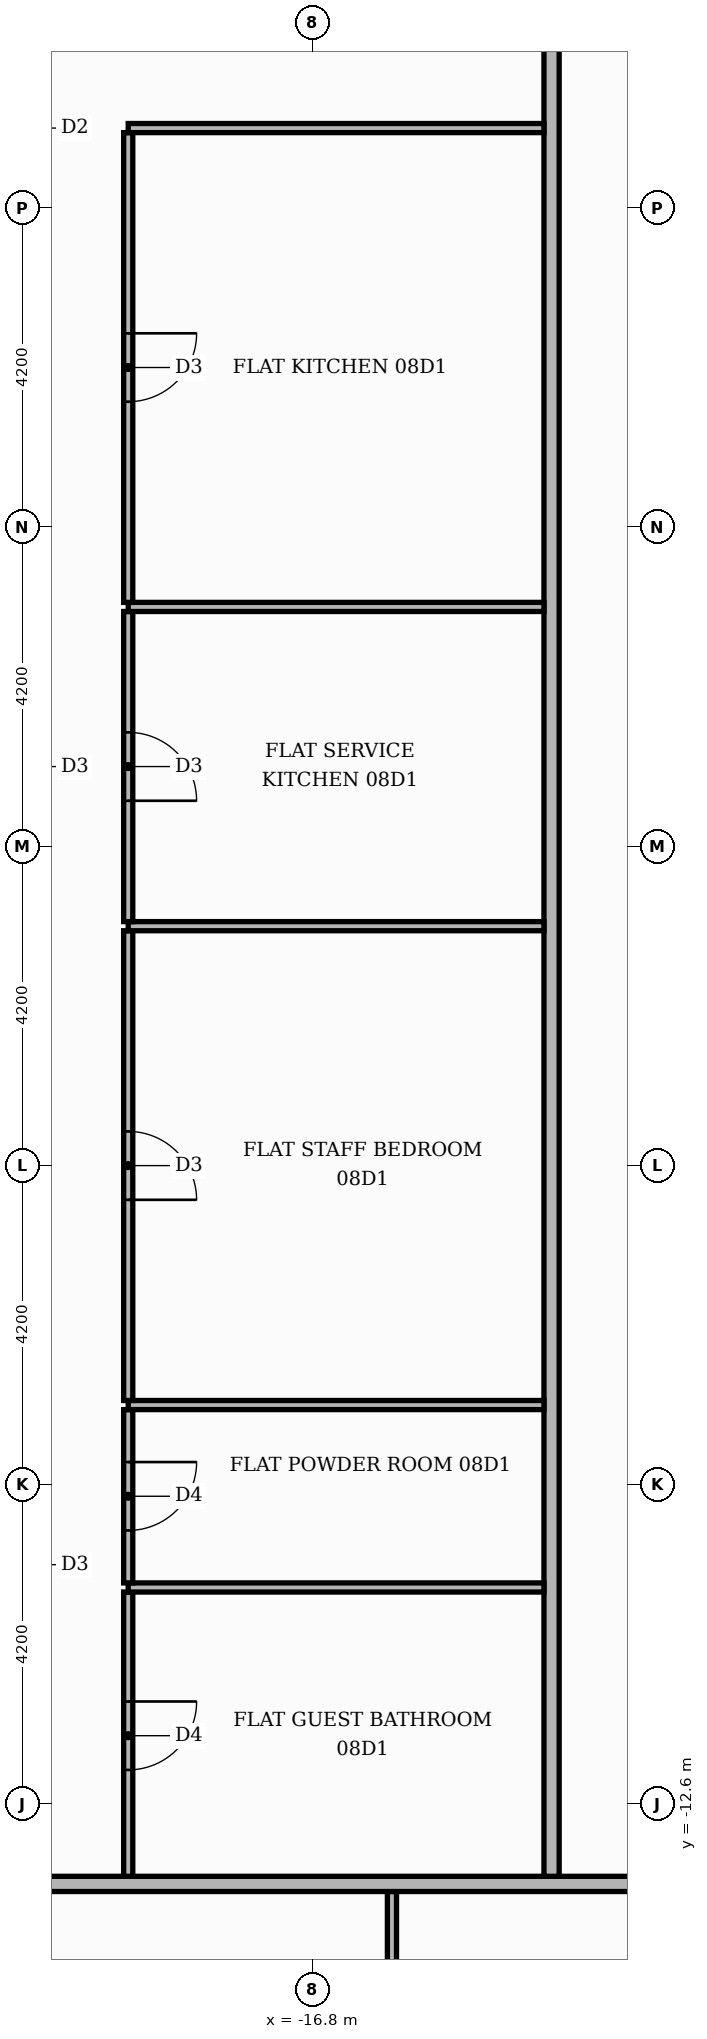
"""IFC4 building model, lengths in metres.
Left out: names, types, materials, properties, quantities, classifications, styles, units other than length and angle.
Written with IfcOpenShell. Run it as: python <this file> out.ifc"""

import sys

from ifc_helpers import new_model, si_unit, direction, frame, frame_2d, origin, place, context, subcontext, project, spatial, rectangle, extrude, element, fill, save


model = new_model("IFC4")
c1 = context("Model", 3, precision=1e-05, world=origin(), true_north=direction((0.0, 1.0)))
c2 = subcontext(c1, "Body", "Model", "MODEL_VIEW")
j1 = project(units=[si_unit("LENGTHUNIT", "METRE"), si_unit("PLANEANGLEUNIT", "RADIAN")], contexts=[c1])
p1 = place(None, origin())
s1 = spatial("IfcSite", under=j1, at=p1, CompositionType="ELEMENT")
p2 = place(p1, origin())
s2 = spatial("IfcBuilding", under=s1, at=p2, CompositionType="ELEMENT")
p3 = place(p2, frame((0.0, 0.0, 38.7)))
s3 = spatial("IfcBuildingStorey", under=s2, at=p3, CompositionType="ELEMENT", Elevation=38.7)
p4 = place(p3, frame((-15.75, -20.06, 0.0), z_axis=(0.0, 0.0, 1.0), x_axis=(0.0, 1.0, 0.0)))
e1 = element("IfcWall", 1, at=p4, inside=s3, PredefinedType="PARTITIONING", context=c2, shape_type="SweptSolid", body=[
    extrude(rectangle(XDim=6.31, YDim=0.12, at=frame_2d((3.155, 0.0))), origin(), (0.0, 0.0, 1.0), 3.48),
])
p5 = place(p4, frame((2.675, 0.0, 0.0)))
e2 = element("IfcOpeningElement", 2, at=p5, cuts=e1, PredefinedType="OPENING", context=c2, shape_type="SweptSolid", body=[
    extrude(rectangle(XDim=1.0, YDim=2.1, at=frame_2d((0.5, 1.05))), frame((0.0, 0.07, 0.0), z_axis=(0.0, -1.0, 0.0), x_axis=(1.0, 0.0, 0.0)), (0.0, 0.0, 1.0), 0.14),
])
p6 = place(p3, frame((-25.42, -13.65, 0.0), z_axis=(0.0, 0.0, 1.0), x_axis=(1.0, 0.0, 0.0)))
e3 = element("IfcWall", 3, at=p6, inside=s3, PredefinedType="PARTITIONING", context=c2, shape_type="SweptSolid", body=[
    extrude(rectangle(XDim=39.07, YDim=0.2, at=frame_2d((19.535, 0.0))), origin(), (0.0, 0.0, 1.0), 3.48),
])
p7 = place(p6, frame((13.32, 0.0, 0.0)))
e4 = element("IfcOpeningElement", 4, at=p7, cuts=e3, PredefinedType="OPENING", context=c2, shape_type="SweptSolid", body=[
    extrude(rectangle(XDim=1.1, YDim=2.4, at=frame_2d((0.55, 1.2))), frame((0.0, 0.11, 0.0), z_axis=(0.0, -1.0, 0.0), x_axis=(1.0, 0.0, 0.0)), (0.0, 0.0, 1.0), 0.22),
])
p8 = place(p6, frame((21.72, 0.0, 0.0)))
e5 = element("IfcOpeningElement", 5, at=p8, cuts=e3, PredefinedType="OPENING", context=c2, shape_type="SweptSolid", body=[
    extrude(rectangle(XDim=1.1, YDim=2.4, at=frame_2d((0.55, 1.2))), frame((0.0, 0.11, 0.0), z_axis=(0.0, -1.0, 0.0), x_axis=(1.0, 0.0, 0.0)), (0.0, 0.0, 1.0), 0.22),
])
p9 = place(p3, frame((-19.22, -13.55, 0.0), z_axis=(0.0, 0.0, 1.0), x_axis=(0.0, 1.0, 0.0)))
e6 = element("IfcWall", 6, at=p9, inside=s3, PredefinedType="PARTITIONING", context=c2, shape_type="SweptSolid", body=[
    extrude(rectangle(XDim=3.74, YDim=0.12, at=frame_2d((1.87, 0.0))), origin(), (0.0, 0.0, 1.0), 3.48),
])
p10 = place(p9, frame((1.4, 0.0, 0.0)))
e7 = element("IfcOpeningElement", 7, at=p10, cuts=e6, PredefinedType="OPENING", context=c2, shape_type="SweptSolid", body=[
    extrude(rectangle(XDim=0.9, YDim=2.1, at=frame_2d((0.45, 1.05))), frame((0.0, 0.07, 0.0), z_axis=(0.0, -1.0, 0.0), x_axis=(1.0, 0.0, 0.0)), (0.0, 0.0, 1.0), 0.14),
])
p11 = place(p3, frame((-13.65, -13.55, 0.0), z_axis=(0.0, 0.0, 1.0), x_axis=(0.0, 1.0, 0.0)))
e8 = element("IfcWall", 8, at=p11, inside=s3, PredefinedType="PARTITIONING", context=c2, shape_type="SweptSolid", body=[
    extrude(rectangle(XDim=27.1, YDim=0.2, at=frame_2d((13.55, 0.0))), origin(), (0.0, 0.0, 1.0), 3.48),
])
p12 = place(p11, frame((24.55, 0.0, 0.0)))
e9 = element("IfcOpeningElement", 9, at=p12, cuts=e8, PredefinedType="OPENING", context=c2, shape_type="SweptSolid", body=[
    extrude(rectangle(XDim=1.1, YDim=2.4, at=frame_2d((0.55, 1.2))), frame((0.0, 0.11, 0.0), z_axis=(0.0, -1.0, 0.0), x_axis=(1.0, 0.0, 0.0)), (0.0, 0.0, 1.0), 0.22),
])
p13 = place(p3, frame((-19.22, -9.75, 0.0), z_axis=(0.0, 0.0, 1.0), x_axis=(1.0, 0.0, 0.0)))
e10 = element("IfcWall", 10, at=p13, inside=s3, PredefinedType="PARTITIONING", context=c2, shape_type="SweptSolid", body=[
    extrude(rectangle(XDim=5.47, YDim=0.12, at=frame_2d((2.735, 0.0))), origin(), (0.0, 0.0, 1.0), 3.48),
])
p14 = place(p3, frame((-19.22, -9.69, 0.0), z_axis=(0.0, 0.0, 1.0), x_axis=(0.0, 1.0, 0.0)))
e11 = element("IfcWall", 11, at=p14, inside=s3, PredefinedType="PARTITIONING", context=c2, shape_type="SweptSolid", body=[
    extrude(rectangle(XDim=2.28, YDim=0.12, at=frame_2d((1.14, 0.0))), origin(), (0.0, 0.0, 1.0), 3.48),
])
p15 = place(p14, frame((0.69, 0.0, 0.0)))
e12 = element("IfcOpeningElement", 12, at=p15, cuts=e11, PredefinedType="OPENING", context=c2, shape_type="SweptSolid", body=[
    extrude(rectangle(XDim=0.9, YDim=2.1, at=frame_2d((0.45, 1.05))), frame((0.0, 0.07, 0.0), z_axis=(0.0, -1.0, 0.0), x_axis=(1.0, 0.0, 0.0)), (0.0, 0.0, 1.0), 0.14),
])
p16 = place(p3, frame((-19.22, -7.35, 0.0), z_axis=(0.0, 0.0, 1.0), x_axis=(1.0, 0.0, 0.0)))
e13 = element("IfcWall", 13, at=p16, inside=s3, PredefinedType="PARTITIONING", context=c2, shape_type="SweptSolid", body=[
    extrude(rectangle(XDim=5.47, YDim=0.12, at=frame_2d((2.735, 0.0))), origin(), (0.0, 0.0, 1.0), 3.48),
])
p17 = place(p3, frame((-19.22, -7.29, 0.0), z_axis=(0.0, 0.0, 1.0), x_axis=(0.0, 1.0, 0.0)))
e14 = element("IfcWall", 14, at=p17, inside=s3, PredefinedType="PARTITIONING", context=c2, shape_type="SweptSolid", body=[
    extrude(rectangle(XDim=6.18, YDim=0.12, at=frame_2d((3.09, 0.0))), origin(), (0.0, 0.0, 1.0), 3.48),
])
p18 = place(p17, frame((2.64, 0.0, 0.0)))
e15 = element("IfcOpeningElement", 15, at=p18, cuts=e14, PredefinedType="OPENING", context=c2, shape_type="SweptSolid", body=[
    extrude(rectangle(XDim=0.9, YDim=2.1, at=frame_2d((0.45, 1.05))), frame((0.0, 0.07, 0.0), z_axis=(0.0, -1.0, 0.0), x_axis=(1.0, 0.0, 0.0)), (0.0, 0.0, 1.0), 0.14),
])
p19 = place(p3, frame((-19.22, -1.05, 0.0), z_axis=(0.0, 0.0, 1.0), x_axis=(1.0, 0.0, 0.0)))
e16 = element("IfcWall", 16, at=p19, inside=s3, PredefinedType="PARTITIONING", context=c2, shape_type="SweptSolid", body=[
    extrude(rectangle(XDim=5.47, YDim=0.12, at=frame_2d((2.735, 0.0))), origin(), (0.0, 0.0, 1.0), 3.48),
])
p20 = place(p3, frame((-19.22, -0.99, 0.0), z_axis=(0.0, 0.0, 1.0), x_axis=(0.0, 1.0, 0.0)))
e17 = element("IfcWall", 17, at=p20, inside=s3, PredefinedType="PARTITIONING", context=c2, shape_type="SweptSolid", body=[
    extrude(rectangle(XDim=4.08, YDim=0.12, at=frame_2d((2.04, 0.0))), origin(), (0.0, 0.0, 1.0), 3.48),
])
p21 = place(p20, frame((1.59, 0.0, 0.0)))
e18 = element("IfcOpeningElement", 18, at=p21, cuts=e17, PredefinedType="OPENING", context=c2, shape_type="SweptSolid", body=[
    extrude(rectangle(XDim=0.9, YDim=2.1, at=frame_2d((0.45, 1.05))), frame((0.0, 0.07, 0.0), z_axis=(0.0, -1.0, 0.0), x_axis=(1.0, 0.0, 0.0)), (0.0, 0.0, 1.0), 0.14),
])
p22 = place(p3, frame((-19.22, 3.15, 0.0), z_axis=(0.0, 0.0, 1.0), x_axis=(1.0, 0.0, 0.0)))
e19 = element("IfcWall", 19, at=p22, inside=s3, PredefinedType="PARTITIONING", context=c2, shape_type="SweptSolid", body=[
    extrude(rectangle(XDim=5.47, YDim=0.12, at=frame_2d((2.735, 0.0))), origin(), (0.0, 0.0, 1.0), 3.48),
])
p23 = place(p3, frame((-19.22, 3.21, 0.0), z_axis=(0.0, 0.0, 1.0), x_axis=(0.0, 1.0, 0.0)))
e20 = element("IfcWall", 20, at=p23, inside=s3, PredefinedType="PARTITIONING", context=c2, shape_type="SweptSolid", body=[
    extrude(rectangle(XDim=6.18, YDim=0.12, at=frame_2d((3.09, 0.0))), origin(), (0.0, 0.0, 1.0), 3.48),
])
p24 = place(p23, frame((2.64, 0.0, 0.0)))
e21 = element("IfcOpeningElement", 21, at=p24, cuts=e20, PredefinedType="OPENING", context=c2, shape_type="SweptSolid", body=[
    extrude(rectangle(XDim=0.9, YDim=2.1, at=frame_2d((0.45, 1.05))), frame((0.0, 0.07, 0.0), z_axis=(0.0, -1.0, 0.0), x_axis=(1.0, 0.0, 0.0)), (0.0, 0.0, 1.0), 0.14),
])
p25 = place(p3, frame((-19.22, 9.45, 0.0), z_axis=(0.0, 0.0, 1.0), x_axis=(1.0, 0.0, 0.0)))
e22 = element("IfcWall", 22, at=p25, inside=s3, PredefinedType="PARTITIONING", context=c2, shape_type="SweptSolid", body=[
    extrude(rectangle(XDim=5.47, YDim=0.12, at=frame_2d((2.735, 0.0))), origin(), (0.0, 0.0, 1.0), 3.48),
])
p26 = place(p24, frame((0.9, 0.0, 0.0), z_axis=(0.0, 0.0, 1.0), x_axis=(-1.0, 0.0, 0.0)))
e23 = element("IfcDoor", 23, at=p26, inside=s3, OperationType="SINGLE_SWING_RIGHT", PredefinedType="DOOR", context=c2, shape_type="SweptSolid", body=[
    extrude(rectangle(XDim=0.9, YDim=2.1, at=frame_2d((0.45, 1.05))), frame((0.0, 0.025, 0.0), z_axis=(0.0, -1.0, 0.0), x_axis=(1.0, 0.0, 0.0)), (0.0, 0.0, 1.0), 0.05),
])
fill(e21, e23)
p27 = place(p21, frame((0.9, 0.0, 0.0), z_axis=(0.0, 0.0, 1.0), x_axis=(-1.0, 0.0, 0.0)))
e24 = element("IfcDoor", 24, at=p27, inside=s3, OperationType="SINGLE_SWING_LEFT", PredefinedType="DOOR", context=c2, shape_type="SweptSolid", body=[
    extrude(rectangle(XDim=0.9, YDim=2.1, at=frame_2d((0.45, 1.05))), frame((0.0, 0.025, 0.0), z_axis=(0.0, -1.0, 0.0), x_axis=(1.0, 0.0, 0.0)), (0.0, 0.0, 1.0), 0.05),
])
fill(e18, e24)
p28 = place(p18, frame((0.9, 0.0, 0.0), z_axis=(0.0, 0.0, 1.0), x_axis=(-1.0, 0.0, 0.0)))
e25 = element("IfcDoor", 25, at=p28, inside=s3, OperationType="SINGLE_SWING_LEFT", PredefinedType="DOOR", context=c2, shape_type="SweptSolid", body=[
    extrude(rectangle(XDim=0.9, YDim=2.1, at=frame_2d((0.45, 1.05))), frame((0.0, 0.025, 0.0), z_axis=(0.0, -1.0, 0.0), x_axis=(1.0, 0.0, 0.0)), (0.0, 0.0, 1.0), 0.05),
])
fill(e15, e25)
p29 = place(p15, frame((0.9, 0.0, 0.0), z_axis=(0.0, 0.0, 1.0), x_axis=(-1.0, 0.0, 0.0)))
e26 = element("IfcDoor", 26, at=p29, inside=s3, OperationType="SINGLE_SWING_RIGHT", PredefinedType="DOOR", context=c2, shape_type="SweptSolid", body=[
    extrude(rectangle(XDim=0.9, YDim=2.1, at=frame_2d((0.45, 1.05))), frame((0.0, 0.025, 0.0), z_axis=(0.0, -1.0, 0.0), x_axis=(1.0, 0.0, 0.0)), (0.0, 0.0, 1.0), 0.05),
])
fill(e12, e26)
p30 = place(p10, frame((0.9, 0.0, 0.0), z_axis=(0.0, 0.0, 1.0), x_axis=(-1.0, 0.0, 0.0)))
e27 = element("IfcDoor", 27, at=p30, inside=s3, OperationType="SINGLE_SWING_RIGHT", PredefinedType="DOOR", context=c2, shape_type="SweptSolid", body=[
    extrude(rectangle(XDim=0.9, YDim=2.1, at=frame_2d((0.45, 1.05))), frame((0.0, 0.025, 0.0), z_axis=(0.0, -1.0, 0.0), x_axis=(1.0, 0.0, 0.0)), (0.0, 0.0, 1.0), 0.05),
])
fill(e7, e27)
save(model, sys.argv[1])
